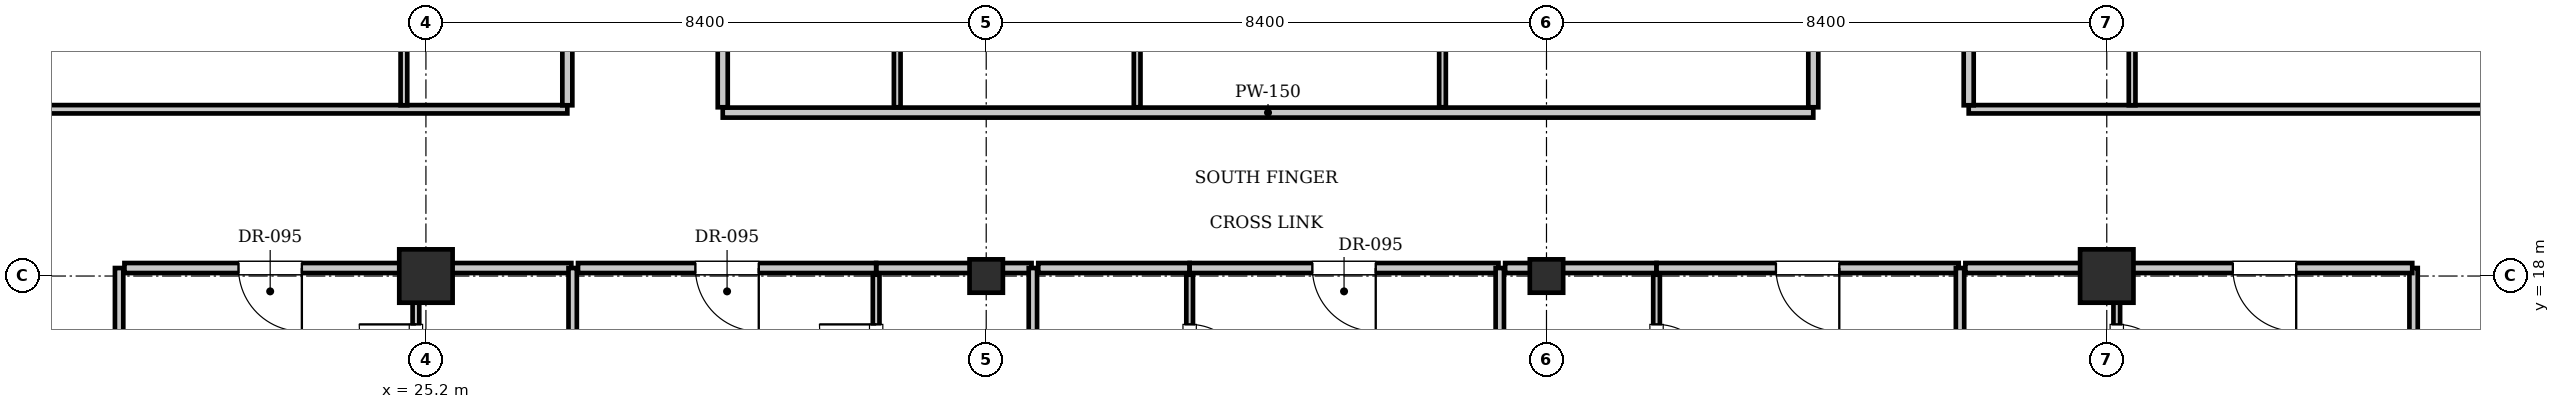
"""IFC4 building model, lengths in metres.
Left out: names, types, materials, properties, quantities, classifications, styles, units other than length and angle.
Written with IfcOpenShell. Run it as: python <this file> out.ifc"""

import sys

from ifc_helpers import new_model, si_unit, direction, frame, frame_2d, origin, origin_2d, place, context, subcontext, project, spatial, rectangle, i_section, extrude, element, fill, save


model = new_model("IFC4")
c1 = context("Model", 3, precision=1e-05, world=origin(), true_north=direction((0.0, 1.0)))
c2 = subcontext(c1, "Body", "Model", "MODEL_VIEW")
j1 = project(units=[si_unit("LENGTHUNIT", "METRE"), si_unit("PLANEANGLEUNIT", "RADIAN")], contexts=[c1])
p1 = place(None, origin())
s1 = spatial("IfcSite", under=j1, at=p1, CompositionType="ELEMENT")
p2 = place(p1, origin())
s2 = spatial("IfcBuilding", under=s1, at=p2, CompositionType="ELEMENT")
p3 = place(p2, frame((0.0, 0.0, 270.2)))
s3 = spatial("IfcBuildingStorey", under=s2, at=p3, CompositionType="ELEMENT", Elevation=270.2)
for number, where, z_axis, x_axis in (
    (1, (25.2, 18.0, 0.0), (0.0, 0.0, 1.0), (1.0, 0.0, 0.0)),
    (2, (50.4, 18.0, 0.0), (0.0, 0.0, 1.0), (1.0, 0.0, 0.0)),
):
    element("IfcColumn", number, at=place(p3, frame(where, z_axis=z_axis, x_axis=x_axis)), inside=s3, PredefinedType="COLUMN", context=c2, shape_type="SweptSolid", body=[
        extrude(rectangle(XDim=0.8, YDim=0.8, at=origin_2d()), origin(), (0.0, 0.0, 1.0), 3.85),
    ])
for number, where, z_axis, x_axis in (
    (3, (33.6, 18.0, 0.0), (0.0, 0.0, 1.0), (1.0, 0.0, 0.0)),
    (4, (42.0, 18.0, 0.0), (0.0, 0.0, 1.0), (1.0, 0.0, 0.0)),
):
    element("IfcColumn", number, at=place(p3, frame(where, z_axis=z_axis, x_axis=x_axis)), inside=s3, PredefinedType="COLUMN", context=c2, shape_type="SweptSolid", body=[
        extrude(i_section(OverallWidth=0.5, OverallDepth=0.5, WebThickness=0.022, FlangeThickness=0.032, at=origin_2d()), origin(), (0.0, 0.0, 1.0), 3.85),
    ])
p4 = place(p3, frame((29.65, 20.45, 0.0), z_axis=(0.0, 0.0, 1.0), x_axis=(1.0, 0.0, 0.0)))
e5 = element("IfcWall", 5, at=p4, inside=s3, PredefinedType="PARTITIONING", context=c2, shape_type="SweptSolid", body=[
    extrude(rectangle(XDim=16.35, YDim=0.15, at=frame_2d((8.175, 0.0))), origin(), (0.0, 0.0, 1.0), 3.61),
])
for number, where, z_axis, x_axis in (
    (6, (29.65, 20.53, 0.0), (0.0, 0.0, 1.0), (0.0, 1.0, 0.0)),
    (7, (46.0, 20.53, 0.0), (0.0, 0.0, 1.0), (0.0, 1.0, 0.0)),
):
    element("IfcWall", number, at=place(p3, frame(where, z_axis=z_axis, x_axis=x_axis)), inside=s3, PredefinedType="PARTITIONING", context=c2, shape_type="SweptSolid", body=[
        extrude(rectangle(XDim=9.29, YDim=0.15, at=frame_2d((4.645, 0.0))), origin(), (0.0, 0.0, 1.0), 3.61),
    ])
for number, where, z_axis, x_axis in (
    (8, (32.266, 20.53, 0.0), (0.0, 0.0, 1.0), (0.0, 1.0, 0.0)),
    (9, (35.863, 20.53, 0.0), (0.0, 0.0, 1.0), (0.0, 1.0, 0.0)),
    (10, (40.441, 20.53, 0.0), (0.0, 0.0, 1.0), (0.0, 1.0, 0.0)),
):
    element("IfcWall", number, at=place(p3, frame(where, z_axis=z_axis, x_axis=x_axis)), inside=s3, PredefinedType="PARTITIONING", context=c2, shape_type="SweptSolid", body=[
        extrude(rectangle(XDim=9.29, YDim=0.1, at=frame_2d((4.645, 0.0))), origin(), (0.0, 0.0, 1.0), 3.61),
    ])
for number, where, z_axis, x_axis in (
    (11, (20.6, 14.4, 0.0), (0.0, 0.0, 1.0), (0.0, 1.0, 0.0)),
    (12, (55.0, 14.4, 0.0), (0.0, 0.0, 1.0), (0.0, 1.0, 0.0)),
):
    element("IfcWall", number, at=place(p3, frame(where, z_axis=z_axis, x_axis=x_axis)), inside=s3, PredefinedType="PARTITIONING", context=c2, shape_type="SweptSolid", body=[
        extrude(rectangle(XDim=3.72, YDim=0.125, at=frame_2d((1.86, 0.0))), origin(), (0.0, 0.0, 1.0), 3.61),
    ])
p5 = place(p3, frame((25.05, 18.12, 0.0), z_axis=(0.0, 0.0, 1.0), x_axis=(1.0, 0.0, 0.0)))
e13 = element("IfcWall", 13, at=p5, inside=s3, PredefinedType="PARTITIONING", context=c2, shape_type="SweptSolid", body=[
    extrude(rectangle(XDim=2.33, YDim=0.15, at=frame_2d((1.165, 0.0))), origin(), (0.0, 0.0, 1.0), 3.077),
])
p6 = place(p3, frame((25.05, 15.68, 0.0), z_axis=(0.0, 0.0, 1.0), x_axis=(0.0, 1.0, 0.0)))
e14 = element("IfcWall", 14, at=p6, inside=s3, PredefinedType="PARTITIONING", context=c2, shape_type="SweptSolid", body=[
    extrude(rectangle(XDim=2.34, YDim=0.1, at=frame_2d((1.17, 0.0))), origin(), (0.0, 0.0, 1.0), 3.61),
])
p7 = place(p6, frame((0.745, 0.0, 0.0)))
e15 = element("IfcOpeningElement", 15, at=p7, cuts=e14, PredefinedType="OPENING", context=c2, shape_type="SweptSolid", body=[
    extrude(rectangle(XDim=0.85, YDim=2.1, at=frame_2d((0.425, 1.05))), frame((0.0, 0.06, 0.0), z_axis=(0.0, -1.0, 0.0), x_axis=(1.0, 0.0, 0.0)), (0.0, 0.0, 1.0), 0.12),
])
p8 = place(p3, frame((20.68, 18.12, 0.0), z_axis=(0.0, 0.0, 1.0), x_axis=(1.0, 0.0, 0.0)))
e16 = element("IfcWall", 16, at=p8, inside=s3, PredefinedType="PARTITIONING", context=c2, shape_type="SweptSolid", body=[
    extrude(rectangle(XDim=4.37, YDim=0.15, at=frame_2d((2.185, 0.0))), origin(), (0.0, 0.0, 1.0), 3.077),
])
p9 = place(p8, frame((1.71, 0.0, 0.0)))
e17 = element("IfcOpeningElement", 17, at=p9, cuts=e16, PredefinedType="OPENING", context=c2, shape_type="SweptSolid", body=[
    extrude(rectangle(XDim=0.95, YDim=2.15, at=frame_2d((0.475, 1.075))), frame((0.0, 0.085, 0.0), z_axis=(0.0, -1.0, 0.0), x_axis=(1.0, 0.0, 0.0)), (0.0, 0.0, 1.0), 0.17),
])
p10 = place(p3, frame((27.4, 9.3, 0.0), z_axis=(0.0, 0.0, 1.0), x_axis=(0.0, 1.0, 0.0)))
e18 = element("IfcWall", 18, at=p10, inside=s3, PredefinedType="PARTITIONING", context=c2, shape_type="SweptSolid", body=[
    extrude(rectangle(XDim=8.82, YDim=0.125, at=frame_2d((4.41, 0.0))), origin(), (0.0, 0.0, 1.0), 3.61),
])
p11 = place(p3, frame((31.95, 18.12, 0.0), z_axis=(0.0, 0.0, 1.0), x_axis=(1.0, 0.0, 0.0)))
e19 = element("IfcWall", 19, at=p11, inside=s3, PredefinedType="PARTITIONING", context=c2, shape_type="SweptSolid", body=[
    extrude(rectangle(XDim=2.33, YDim=0.15, at=frame_2d((1.165, 0.0))), origin(), (0.0, 0.0, 1.0), 3.077),
])
p12 = place(p3, frame((31.95, 15.68, 0.0), z_axis=(0.0, 0.0, 1.0), x_axis=(0.0, 1.0, 0.0)))
e20 = element("IfcWall", 20, at=p12, inside=s3, PredefinedType="PARTITIONING", context=c2, shape_type="SweptSolid", body=[
    extrude(rectangle(XDim=2.34, YDim=0.1, at=frame_2d((1.17, 0.0))), origin(), (0.0, 0.0, 1.0), 3.61),
])
p13 = place(p12, frame((0.745, 0.0, 0.0)))
e21 = element("IfcOpeningElement", 21, at=p13, cuts=e20, PredefinedType="OPENING", context=c2, shape_type="SweptSolid", body=[
    extrude(rectangle(XDim=0.85, YDim=2.1, at=frame_2d((0.425, 1.05))), frame((0.0, 0.06, 0.0), z_axis=(0.0, -1.0, 0.0), x_axis=(1.0, 0.0, 0.0)), (0.0, 0.0, 1.0), 0.12),
])
p14 = place(p3, frame((27.48, 18.12, 0.0), z_axis=(0.0, 0.0, 1.0), x_axis=(1.0, 0.0, 0.0)))
e22 = element("IfcWall", 22, at=p14, inside=s3, PredefinedType="PARTITIONING", context=c2, shape_type="SweptSolid", body=[
    extrude(rectangle(XDim=4.47, YDim=0.15, at=frame_2d((2.235, 0.0))), origin(), (0.0, 0.0, 1.0), 3.077),
])
p15 = place(p14, frame((1.76, 0.0, 0.0)))
e23 = element("IfcOpeningElement", 23, at=p15, cuts=e22, PredefinedType="OPENING", context=c2, shape_type="SweptSolid", body=[
    extrude(rectangle(XDim=0.95, YDim=2.15, at=frame_2d((0.475, 1.075))), frame((0.0, 0.085, 0.0), z_axis=(0.0, -1.0, 0.0), x_axis=(1.0, 0.0, 0.0)), (0.0, 0.0, 1.0), 0.17),
])
p16 = place(p3, frame((34.3, 9.3, 0.0), z_axis=(0.0, 0.0, 1.0), x_axis=(0.0, 1.0, 0.0)))
e24 = element("IfcWall", 24, at=p16, inside=s3, PredefinedType="PARTITIONING", context=c2, shape_type="SweptSolid", body=[
    extrude(rectangle(XDim=8.82, YDim=0.125, at=frame_2d((4.41, 0.0))), origin(), (0.0, 0.0, 1.0), 3.61),
])
p17 = place(p3, frame((34.38, 18.12, 0.0), z_axis=(0.0, 0.0, 1.0), x_axis=(1.0, 0.0, 0.0)))
e25 = element("IfcWall", 25, at=p17, inside=s3, PredefinedType="PARTITIONING", context=c2, shape_type="SweptSolid", body=[
    extrude(rectangle(XDim=2.27, YDim=0.15, at=frame_2d((1.135, 0.0))), origin(), (0.0, 0.0, 1.0), 3.077),
])
p18 = place(p3, frame((36.65, 15.68, 0.0), z_axis=(0.0, 0.0, 1.0), x_axis=(0.0, 1.0, 0.0)))
e26 = element("IfcWall", 26, at=p18, inside=s3, PredefinedType="PARTITIONING", context=c2, shape_type="SweptSolid", body=[
    extrude(rectangle(XDim=2.34, YDim=0.1, at=frame_2d((1.17, 0.0))), origin(), (0.0, 0.0, 1.0), 3.61),
])
p19 = place(p18, frame((0.745, 0.0, 0.0)))
e27 = element("IfcOpeningElement", 27, at=p19, cuts=e26, PredefinedType="OPENING", context=c2, shape_type="SweptSolid", body=[
    extrude(rectangle(XDim=0.85, YDim=2.1, at=frame_2d((0.425, 1.05))), frame((0.0, 0.06, 0.0), z_axis=(0.0, -1.0, 0.0), x_axis=(1.0, 0.0, 0.0)), (0.0, 0.0, 1.0), 0.12),
])
p20 = place(p3, frame((36.65, 18.12, 0.0), z_axis=(0.0, 0.0, 1.0), x_axis=(1.0, 0.0, 0.0)))
e28 = element("IfcWall", 28, at=p20, inside=s3, PredefinedType="PARTITIONING", context=c2, shape_type="SweptSolid", body=[
    extrude(rectangle(XDim=4.63, YDim=0.15, at=frame_2d((2.315, 0.0))), origin(), (0.0, 0.0, 1.0), 3.077),
])
p21 = place(p20, frame((1.84, 0.0, 0.0)))
e29 = element("IfcOpeningElement", 29, at=p21, cuts=e28, PredefinedType="OPENING", context=c2, shape_type="SweptSolid", body=[
    extrude(rectangle(XDim=0.95, YDim=2.15, at=frame_2d((0.475, 1.075))), frame((0.0, 0.085, 0.0), z_axis=(0.0, -1.0, 0.0), x_axis=(1.0, 0.0, 0.0)), (0.0, 0.0, 1.0), 0.17),
])
p22 = place(p3, frame((41.3, 9.3, 0.0), z_axis=(0.0, 0.0, 1.0), x_axis=(0.0, 1.0, 0.0)))
e30 = element("IfcWall", 30, at=p22, inside=s3, PredefinedType="PARTITIONING", context=c2, shape_type="SweptSolid", body=[
    extrude(rectangle(XDim=8.82, YDim=0.125, at=frame_2d((4.41, 0.0))), origin(), (0.0, 0.0, 1.0), 3.61),
])
p23 = place(p3, frame((41.38, 18.12, 0.0), z_axis=(0.0, 0.0, 1.0), x_axis=(1.0, 0.0, 0.0)))
e31 = element("IfcWall", 31, at=p23, inside=s3, PredefinedType="PARTITIONING", context=c2, shape_type="SweptSolid", body=[
    extrude(rectangle(XDim=2.27, YDim=0.15, at=frame_2d((1.135, 0.0))), origin(), (0.0, 0.0, 1.0), 3.077),
])
p24 = place(p3, frame((43.65, 15.68, 0.0), z_axis=(0.0, 0.0, 1.0), x_axis=(0.0, 1.0, 0.0)))
e32 = element("IfcWall", 32, at=p24, inside=s3, PredefinedType="PARTITIONING", context=c2, shape_type="SweptSolid", body=[
    extrude(rectangle(XDim=2.34, YDim=0.1, at=frame_2d((1.17, 0.0))), origin(), (0.0, 0.0, 1.0), 3.61),
])
p25 = place(p24, frame((0.745, 0.0, 0.0)))
e33 = element("IfcOpeningElement", 33, at=p25, cuts=e32, PredefinedType="OPENING", context=c2, shape_type="SweptSolid", body=[
    extrude(rectangle(XDim=0.85, YDim=2.1, at=frame_2d((0.425, 1.05))), frame((0.0, 0.06, 0.0), z_axis=(0.0, -1.0, 0.0), x_axis=(1.0, 0.0, 0.0)), (0.0, 0.0, 1.0), 0.12),
])
p26 = place(p3, frame((43.65, 18.12, 0.0), z_axis=(0.0, 0.0, 1.0), x_axis=(1.0, 0.0, 0.0)))
e34 = element("IfcWall", 34, at=p26, inside=s3, PredefinedType="PARTITIONING", context=c2, shape_type="SweptSolid", body=[
    extrude(rectangle(XDim=4.53, YDim=0.15, at=frame_2d((2.265, 0.0))), origin(), (0.0, 0.0, 1.0), 3.077),
])
p27 = place(p26, frame((1.79, 0.0, 0.0)))
e35 = element("IfcOpeningElement", 35, at=p27, cuts=e34, PredefinedType="OPENING", context=c2, shape_type="SweptSolid", body=[
    extrude(rectangle(XDim=0.95, YDim=2.15, at=frame_2d((0.475, 1.075))), frame((0.0, 0.085, 0.0), z_axis=(0.0, -1.0, 0.0), x_axis=(1.0, 0.0, 0.0)), (0.0, 0.0, 1.0), 0.17),
])
p28 = place(p3, frame((48.2, 9.3, 0.0), z_axis=(0.0, 0.0, 1.0), x_axis=(0.0, 1.0, 0.0)))
e36 = element("IfcWall", 36, at=p28, inside=s3, PredefinedType="PARTITIONING", context=c2, shape_type="SweptSolid", body=[
    extrude(rectangle(XDim=8.82, YDim=0.125, at=frame_2d((4.41, 0.0))), origin(), (0.0, 0.0, 1.0), 3.61),
])
p29 = place(p3, frame((48.28, 18.12, 0.0), z_axis=(0.0, 0.0, 1.0), x_axis=(1.0, 0.0, 0.0)))
e37 = element("IfcWall", 37, at=p29, inside=s3, PredefinedType="PARTITIONING", context=c2, shape_type="SweptSolid", body=[
    extrude(rectangle(XDim=2.27, YDim=0.15, at=frame_2d((1.135, 0.0))), origin(), (0.0, 0.0, 1.0), 3.077),
])
p30 = place(p3, frame((50.55, 15.68, 0.0), z_axis=(0.0, 0.0, 1.0), x_axis=(0.0, 1.0, 0.0)))
e38 = element("IfcWall", 38, at=p30, inside=s3, PredefinedType="PARTITIONING", context=c2, shape_type="SweptSolid", body=[
    extrude(rectangle(XDim=2.34, YDim=0.1, at=frame_2d((1.17, 0.0))), origin(), (0.0, 0.0, 1.0), 3.61),
])
p31 = place(p30, frame((0.745, 0.0, 0.0)))
e39 = element("IfcOpeningElement", 39, at=p31, cuts=e38, PredefinedType="OPENING", context=c2, shape_type="SweptSolid", body=[
    extrude(rectangle(XDim=0.85, YDim=2.1, at=frame_2d((0.425, 1.05))), frame((0.0, 0.06, 0.0), z_axis=(0.0, -1.0, 0.0), x_axis=(1.0, 0.0, 0.0)), (0.0, 0.0, 1.0), 0.12),
])
p32 = place(p3, frame((50.55, 18.12, 0.0), z_axis=(0.0, 0.0, 1.0), x_axis=(1.0, 0.0, 0.0)))
e40 = element("IfcWall", 40, at=p32, inside=s3, PredefinedType="PARTITIONING", context=c2, shape_type="SweptSolid", body=[
    extrude(rectangle(XDim=4.43, YDim=0.15, at=frame_2d((2.215, 0.0))), origin(), (0.0, 0.0, 1.0), 3.077),
])
p33 = place(p32, frame((1.74, 0.0, 0.0)))
e41 = element("IfcOpeningElement", 41, at=p33, cuts=e40, PredefinedType="OPENING", context=c2, shape_type="SweptSolid", body=[
    extrude(rectangle(XDim=0.95, YDim=2.15, at=frame_2d((0.475, 1.075))), frame((0.0, 0.085, 0.0), z_axis=(0.0, -1.0, 0.0), x_axis=(1.0, 0.0, 0.0)), (0.0, 0.0, 1.0), 0.17),
])
p34 = place(p3, frame((15.5, 20.5, 0.0), z_axis=(0.0, 0.0, 1.0), x_axis=(1.0, 0.0, 0.0)))
e42 = element("IfcWall", 42, at=p34, inside=s3, PredefinedType="PARTITIONING", context=c2, shape_type="SweptSolid", body=[
    extrude(rectangle(XDim=11.82, YDim=0.125, at=frame_2d((5.91, 0.0))), origin(), (0.0, 0.0, 1.0), 3.61),
])
p35 = place(p3, frame((48.33, 20.5, 0.0), z_axis=(0.0, 0.0, 1.0), x_axis=(1.0, 0.0, 0.0)))
e43 = element("IfcWall", 43, at=p35, inside=s3, PredefinedType="PARTITIONING", context=c2, shape_type="SweptSolid", body=[
    extrude(rectangle(XDim=11.77, YDim=0.125, at=frame_2d((5.885, 0.0))), origin(), (0.0, 0.0, 1.0), 3.61),
])
p36 = place(p3, frame((27.32, 20.56, 0.0), z_axis=(0.0, 0.0, 1.0), x_axis=(0.0, 1.0, 0.0)))
e44 = element("IfcWall", 44, at=p36, inside=s3, PredefinedType="PARTITIONING", context=c2, shape_type="SweptSolid", body=[
    extrude(rectangle(XDim=2.08, YDim=0.15, at=frame_2d((1.04, 0.0))), origin(), (0.0, 0.0, 1.0), 3.61),
])
p37 = place(p3, frame((24.87, 20.56, 0.0), z_axis=(0.0, 0.0, 1.0), x_axis=(0.0, 1.0, 0.0)))
e45 = element("IfcWall", 45, at=p37, inside=s3, PredefinedType="PARTITIONING", context=c2, shape_type="SweptSolid", body=[
    extrude(rectangle(XDim=2.08, YDim=0.1, at=frame_2d((1.04, 0.0))), origin(), (0.0, 0.0, 1.0), 3.61),
])
p38 = place(p3, frame((48.33, 20.56, 0.0), z_axis=(0.0, 0.0, 1.0), x_axis=(0.0, 1.0, 0.0)))
e46 = element("IfcWall", 46, at=p38, inside=s3, PredefinedType="PARTITIONING", context=c2, shape_type="SweptSolid", body=[
    extrude(rectangle(XDim=2.08, YDim=0.15, at=frame_2d((1.04, 0.0))), origin(), (0.0, 0.0, 1.0), 3.61),
])
p39 = place(p3, frame((50.78, 20.56, 0.0), z_axis=(0.0, 0.0, 1.0), x_axis=(0.0, 1.0, 0.0)))
e47 = element("IfcWall", 47, at=p39, inside=s3, PredefinedType="PARTITIONING", context=c2, shape_type="SweptSolid", body=[
    extrude(rectangle(XDim=2.08, YDim=0.1, at=frame_2d((1.04, 0.0))), origin(), (0.0, 0.0, 1.0), 3.61),
])
p40 = place(p7, origin())
e48 = element("IfcDoor", 48, at=p40, inside=s3, OperationType="SINGLE_SWING_RIGHT", PredefinedType="DOOR", context=c2, shape_type="SweptSolid", body=[
    extrude(rectangle(XDim=0.85, YDim=2.1, at=frame_2d((0.425, 1.05))), frame((0.0, 0.025, 0.0), z_axis=(0.0, -1.0, 0.0), x_axis=(1.0, 0.0, 0.0)), (0.0, 0.0, 1.0), 0.05),
])
fill(e15, e48)
p41 = place(p9, frame((0.95, 0.0, 0.0), z_axis=(0.0, 0.0, 1.0), x_axis=(-1.0, 0.0, 0.0)))
e49 = element("IfcDoor", 49, at=p41, inside=s3, OperationType="SINGLE_SWING_LEFT", PredefinedType="DOOR", context=c2, shape_type="SweptSolid", body=[
    extrude(rectangle(XDim=0.95, YDim=2.15, at=frame_2d((0.475, 1.075))), frame((0.0, 0.025, 0.0), z_axis=(0.0, -1.0, 0.0), x_axis=(1.0, 0.0, 0.0)), (0.0, 0.0, 1.0), 0.05),
])
fill(e17, e49)
p42 = place(p13, origin())
e50 = element("IfcDoor", 50, at=p42, inside=s3, OperationType="SINGLE_SWING_RIGHT", PredefinedType="DOOR", context=c2, shape_type="SweptSolid", body=[
    extrude(rectangle(XDim=0.85, YDim=2.1, at=frame_2d((0.425, 1.05))), frame((0.0, 0.025, 0.0), z_axis=(0.0, -1.0, 0.0), x_axis=(1.0, 0.0, 0.0)), (0.0, 0.0, 1.0), 0.05),
])
fill(e21, e50)
p43 = place(p15, frame((0.95, 0.0, 0.0), z_axis=(0.0, 0.0, 1.0), x_axis=(-1.0, 0.0, 0.0)))
e51 = element("IfcDoor", 51, at=p43, inside=s3, OperationType="SINGLE_SWING_LEFT", PredefinedType="DOOR", context=c2, shape_type="SweptSolid", body=[
    extrude(rectangle(XDim=0.95, YDim=2.15, at=frame_2d((0.475, 1.075))), frame((0.0, 0.025, 0.0), z_axis=(0.0, -1.0, 0.0), x_axis=(1.0, 0.0, 0.0)), (0.0, 0.0, 1.0), 0.05),
])
fill(e23, e51)
p44 = place(p19, frame((0.85, 0.0, 0.0), z_axis=(0.0, 0.0, 1.0), x_axis=(-1.0, 0.0, 0.0)))
e52 = element("IfcDoor", 52, at=p44, inside=s3, OperationType="SINGLE_SWING_RIGHT", PredefinedType="DOOR", context=c2, shape_type="SweptSolid", body=[
    extrude(rectangle(XDim=0.85, YDim=2.1, at=frame_2d((0.425, 1.05))), frame((0.0, 0.025, 0.0), z_axis=(0.0, -1.0, 0.0), x_axis=(1.0, 0.0, 0.0)), (0.0, 0.0, 1.0), 0.05),
])
fill(e27, e52)
p45 = place(p21, frame((0.95, 0.0, 0.0), z_axis=(0.0, 0.0, 1.0), x_axis=(-1.0, 0.0, 0.0)))
e53 = element("IfcDoor", 53, at=p45, inside=s3, OperationType="SINGLE_SWING_LEFT", PredefinedType="DOOR", context=c2, shape_type="SweptSolid", body=[
    extrude(rectangle(XDim=0.95, YDim=2.15, at=frame_2d((0.475, 1.075))), frame((0.0, 0.025, 0.0), z_axis=(0.0, -1.0, 0.0), x_axis=(1.0, 0.0, 0.0)), (0.0, 0.0, 1.0), 0.05),
])
fill(e29, e53)
p46 = place(p25, frame((0.85, 0.0, 0.0), z_axis=(0.0, 0.0, 1.0), x_axis=(-1.0, 0.0, 0.0)))
e54 = element("IfcDoor", 54, at=p46, inside=s3, OperationType="SINGLE_SWING_RIGHT", PredefinedType="DOOR", context=c2, shape_type="SweptSolid", body=[
    extrude(rectangle(XDim=0.85, YDim=2.1, at=frame_2d((0.425, 1.05))), frame((0.0, 0.025, 0.0), z_axis=(0.0, -1.0, 0.0), x_axis=(1.0, 0.0, 0.0)), (0.0, 0.0, 1.0), 0.05),
])
fill(e33, e54)
p47 = place(p27, frame((0.95, 0.0, 0.0), z_axis=(0.0, 0.0, 1.0), x_axis=(-1.0, 0.0, 0.0)))
e55 = element("IfcDoor", 55, at=p47, inside=s3, OperationType="SINGLE_SWING_LEFT", PredefinedType="DOOR", context=c2, shape_type="SweptSolid", body=[
    extrude(rectangle(XDim=0.95, YDim=2.15, at=frame_2d((0.475, 1.075))), frame((0.0, 0.025, 0.0), z_axis=(0.0, -1.0, 0.0), x_axis=(1.0, 0.0, 0.0)), (0.0, 0.0, 1.0), 0.05),
])
fill(e35, e55)
p48 = place(p31, frame((0.85, 0.0, 0.0), z_axis=(0.0, 0.0, 1.0), x_axis=(-1.0, 0.0, 0.0)))
e56 = element("IfcDoor", 56, at=p48, inside=s3, OperationType="SINGLE_SWING_RIGHT", PredefinedType="DOOR", context=c2, shape_type="SweptSolid", body=[
    extrude(rectangle(XDim=0.85, YDim=2.1, at=frame_2d((0.425, 1.05))), frame((0.0, 0.025, 0.0), z_axis=(0.0, -1.0, 0.0), x_axis=(1.0, 0.0, 0.0)), (0.0, 0.0, 1.0), 0.05),
])
fill(e39, e56)
p49 = place(p33, frame((0.95, 0.0, 0.0), z_axis=(0.0, 0.0, 1.0), x_axis=(-1.0, 0.0, 0.0)))
e57 = element("IfcDoor", 57, at=p49, inside=s3, OperationType="SINGLE_SWING_LEFT", PredefinedType="DOOR", context=c2, shape_type="SweptSolid", body=[
    extrude(rectangle(XDim=0.95, YDim=2.15, at=frame_2d((0.475, 1.075))), frame((0.0, 0.025, 0.0), z_axis=(0.0, -1.0, 0.0), x_axis=(1.0, 0.0, 0.0)), (0.0, 0.0, 1.0), 0.05),
])
fill(e41, e57)
save(model, sys.argv[1])
